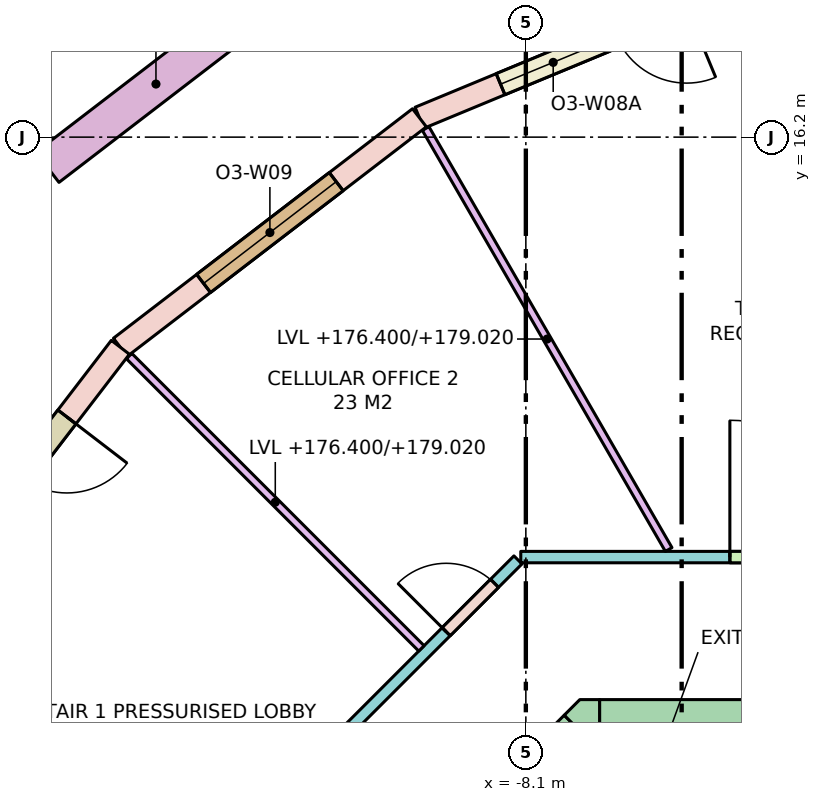
"""IFC4 building model, lengths in metres.
Left out: names, types, materials, properties, quantities, classifications, styles, units other than length and angle.
Written with IfcOpenShell. Run it as: python <this file> out.ifc"""

import sys

from ifc_helpers import new_model, si_unit, direction, frame, frame_2d, origin, place, context, subcontext, project, spatial, polyline, rectangle, outline, extrude, element, fill, save


model = new_model("IFC4")
c1 = context("Model", 3, precision=1e-05, world=origin(), true_north=direction((0.0, 1.0)))
c2 = subcontext(c1, "Body", "Model", "MODEL_VIEW")
j1 = project(units=[si_unit("LENGTHUNIT", "METRE"), si_unit("PLANEANGLEUNIT", "RADIAN")], contexts=[c1])
p1 = place(None, origin())
s1 = spatial("IfcSite", under=j1, at=p1, CompositionType="ELEMENT")
p2 = place(p1, origin())
s2 = spatial("IfcBuilding", under=s1, at=p2, CompositionType="ELEMENT")
p3 = place(p2, frame((0.0, 0.0, 176.4)))
s3 = spatial("IfcBuildingStorey", under=s2, at=p3, CompositionType="ELEMENT", Elevation=176.4)
p4 = place(p3, frame((-7.13, 8.45, -0.28), z_axis=(0.0, 0.0, 1.0), x_axis=(1.0, 0.0, 0.0)))
e1 = element("IfcWall", 1, at=p4, inside=s3, PredefinedType="SHEAR", context=c2, shape_type="SweptSolid", body=[
    extrude(rectangle(XDim=14.26, YDim=0.7, at=frame_2d((7.13, 0.0))), origin(), (0.0, 0.0, 1.0), 3.7),
])
p5 = place(p4, frame((5.48, 0.0, 0.28)))
e2 = element("IfcOpeningElement", 2, at=p5, cuts=e1, PredefinedType="OPENING", context=c2, shape_type="SweptSolid", body=[
    extrude(rectangle(XDim=0.7, YDim=2.1, at=frame_2d((0.35, 1.05))), frame((0.0, 0.36, 0.0), z_axis=(0.0, -1.0, 0.0), x_axis=(1.0, 0.0, 0.0)), (0.0, 0.0, 1.0), 0.72),
])
p6 = place(p4, frame((7.155, 0.0, 0.28)))
e3 = element("IfcOpeningElement", 3, at=p6, cuts=e1, PredefinedType="OPENING", context=c2, shape_type="SweptSolid", body=[
    extrude(rectangle(XDim=0.9, YDim=2.1, at=frame_2d((0.45, 1.05))), frame((0.0, 0.36, 0.0), z_axis=(0.0, -1.0, 0.0), x_axis=(1.0, 0.0, 0.0)), (0.0, 0.0, 1.0), 0.72),
])
p7 = place(p3, frame((-10.347, 5.347, -0.28), z_axis=(0.0, 0.0, 1.0), x_axis=(0.707106781187, 0.707106781187, 0.0)))
e4 = element("IfcWall", 4, at=p7, inside=s3, PredefinedType="SHEAR", context=c2, shape_type="SweptSolid", body=[
    extrude(rectangle(XDim=4.243, YDim=0.7, at=frame_2d((2.121, 0.0))), origin(), (0.0, 0.0, 1.0), 3.7),
])
p8 = place(p7, frame((0.65, 0.0, 0.28)))
e5 = element("IfcOpeningElement", 5, at=p8, cuts=e4, PredefinedType="OPENING", context=c2, shape_type="SweptSolid", body=[
    extrude(rectangle(XDim=1.2, YDim=2.1, at=frame_2d((0.6, 1.05))), frame((0.0, 0.36, 0.0), z_axis=(0.0, -1.0, 0.0), x_axis=(1.0, 0.0, 0.0)), (0.0, 0.0, 1.0), 0.72),
])
p9 = place(p3, frame((0.0, 0.0, -0.28)))
e6 = element("IfcWall", 6, at=p9, inside=s3, PredefinedType="SHEAR", context=c2, shape_type="SweptSolid", body=[
    extrude(outline(polyline([(-7.39, 8.8), (-7.13, 8.8), (-7.13, 8.8), (-7.13, 8.13), (-7.595, 8.595), (-7.595, 8.595), (-7.595, 8.595), (-7.39, 8.8)])), origin(), (0.0, 0.0, 1.0), 3.7),
])
p10 = place(p3, frame((-4.917, 18.353, 0.0), z_axis=(0.0, 0.0, 1.0), x_axis=(-0.923893254961, -0.382650301762, 0.0)))
e7 = element("IfcWall", 7, at=p10, inside=s3, PredefinedType="STANDARD", context=c2, shape_type="SweptSolid", body=[
    extrude(rectangle(XDim=4.96, YDim=0.3, at=frame_2d((2.48, 0.0))), origin(), (0.0, 0.0, 1.0), 3.42),
])
p11 = place(p10, frame((1.155, 0.0, 0.0)))
e8 = element("IfcOpeningElement", 8, at=p11, cuts=e7, PredefinedType="OPENING", context=c2, shape_type="SweptSolid", body=[
    extrude(rectangle(XDim=1.0, YDim=2.4, at=frame_2d((0.5, 1.2))), frame((0.0, 0.16, 0.0), z_axis=(0.0, -1.0, 0.0), x_axis=(1.0, 0.0, 0.0)), (0.0, 0.0, 1.0), 0.32),
])
p12 = place(p10, frame((2.305, 0.0, 0.8)))
e9 = element("IfcOpeningElement", 9, at=p12, cuts=e7, PredefinedType="OPENING", context=c2, shape_type="SweptSolid", body=[
    extrude(rectangle(XDim=1.5, YDim=2.4, at=frame_2d((0.75, 1.2))), frame((0.0, 0.16, 0.0), z_axis=(0.0, -1.0, 0.0), x_axis=(1.0, 0.0, 0.0)), (0.0, 0.0, 1.0), 0.32),
])
p13 = place(p3, frame((-9.5, 16.455, 0.0), z_axis=(0.0, 0.0, 1.0), x_axis=(-0.793348024649, -0.608768356425, 0.0)))
e10 = element("IfcWall", 10, at=p13, inside=s3, PredefinedType="STANDARD", context=c2, shape_type="SweptSolid", body=[
    extrude(rectangle(XDim=4.96, YDim=0.3, at=frame_2d((2.48, 0.0))), origin(), (0.0, 0.0, 1.0), 3.42),
])
p14 = place(p13, frame((1.38, 0.0, 0.8)))
e11 = element("IfcOpeningElement", 11, at=p14, cuts=e10, PredefinedType="OPENING", context=c2, shape_type="SweptSolid", body=[
    extrude(rectangle(XDim=2.2, YDim=2.4, at=frame_2d((1.1, 1.2))), frame((0.0, 0.16, 0.0), z_axis=(0.0, -1.0, 0.0), x_axis=(1.0, 0.0, 0.0)), (0.0, 0.0, 1.0), 0.32),
])
p15 = place(p3, frame((-13.435, 13.435, 0.0), z_axis=(0.0, 0.0, 1.0), x_axis=(-0.608768356425, -0.793348024649, 0.0)))
e12 = element("IfcWall", 12, at=p15, inside=s3, PredefinedType="STANDARD", context=c2, shape_type="SweptSolid", body=[
    extrude(rectangle(XDim=4.96, YDim=0.3, at=frame_2d((2.48, 0.0))), origin(), (0.0, 0.0, 1.0), 3.42),
])
p16 = place(p15, frame((1.155, 0.0, 0.0)))
e13 = element("IfcOpeningElement", 13, at=p16, cuts=e12, PredefinedType="OPENING", context=c2, shape_type="SweptSolid", body=[
    extrude(rectangle(XDim=1.0, YDim=2.4, at=frame_2d((0.5, 1.2))), frame((0.0, 0.16, 0.0), z_axis=(0.0, -1.0, 0.0), x_axis=(1.0, 0.0, 0.0)), (0.0, 0.0, 1.0), 0.32),
])
p17 = place(p15, frame((2.305, 0.0, 0.8)))
e14 = element("IfcOpeningElement", 14, at=p17, cuts=e12, PredefinedType="OPENING", context=c2, shape_type="SweptSolid", body=[
    extrude(rectangle(XDim=1.5, YDim=2.4, at=frame_2d((0.75, 1.2))), frame((0.0, 0.16, 0.0), z_axis=(0.0, -1.0, 0.0), x_axis=(1.0, 0.0, 0.0)), (0.0, 0.0, 1.0), 0.32),
])
p18 = place(p3, frame((-11.539, 17.994, 0.0), z_axis=(0.0, 0.0, 1.0), x_axis=(-0.793384730612, -0.608720518162, 0.0)))
e15 = element("IfcWall", 15, at=p18, inside=s3, PredefinedType="PARAPET", context=c2, shape_type="SweptSolid", body=[
    extrude(rectangle(XDim=3.6, YDim=0.5, at=frame_2d((1.8, 0.0))), origin(), (0.0, 0.0, 1.0), 0.9),
])
p19 = place(p3, frame((-12.638, 6.204, 0.0), z_axis=(0.0, 0.0, 1.0), x_axis=(0.707106781187, 0.707106781187, 0.0)))
e16 = element("IfcWall", 16, at=p19, inside=s3, PredefinedType="PARTITIONING", context=c2, shape_type="SweptSolid", body=[
    extrude(rectangle(XDim=6.271, YDim=0.15, at=frame_2d((3.135, 0.0))), origin(), (0.0, 0.0, 1.0), 2.62),
])
p20 = place(p19, frame((4.935, 0.0, 0.0)))
e17 = element("IfcOpeningElement", 17, at=p20, cuts=e16, PredefinedType="OPENING", context=c2, shape_type="SweptSolid", body=[
    extrude(rectangle(XDim=0.9, YDim=2.1, at=frame_2d((0.45, 1.05))), frame((0.0, 0.085, 0.0), z_axis=(0.0, -1.0, 0.0), x_axis=(1.0, 0.0, 0.0)), (0.0, 0.0, 1.0), 0.17),
])
p21 = place(p3, frame((-8.167, 10.675, 0.0), z_axis=(0.0, 0.0, 1.0), x_axis=(1.0, 0.0, 0.0)))
e18 = element("IfcWall", 18, at=p21, inside=s3, PredefinedType="PARTITIONING", context=c2, shape_type="SweptSolid", body=[
    extrude(rectangle(XDim=16.333, YDim=0.15, at=frame_2d((8.167, 0.0))), origin(), (0.0, 0.0, 1.0), 2.62),
])
p22 = place(p21, frame((12.232, 0.0, 0.0)))
e19 = element("IfcOpeningElement", 19, at=p22, cuts=e18, PredefinedType="OPENING", context=c2, shape_type="SweptSolid", body=[
    extrude(rectangle(XDim=0.9, YDim=2.1, at=frame_2d((0.45, 1.05))), frame((0.0, 0.085, 0.0), z_axis=(0.0, -1.0, 0.0), x_axis=(1.0, 0.0, 0.0)), (0.0, 0.0, 1.0), 0.17),
])
p23 = place(p21, frame((9.148, 0.0, 0.0)))
e20 = element("IfcOpeningElement", 20, at=p23, cuts=e18, PredefinedType="OPENING", context=c2, shape_type="SweptSolid", body=[
    extrude(rectangle(XDim=0.9, YDim=2.1, at=frame_2d((0.45, 1.05))), frame((0.0, 0.085, 0.0), z_axis=(0.0, -1.0, 0.0), x_axis=(1.0, 0.0, 0.0)), (0.0, 0.0, 1.0), 0.17),
])
p24 = place(p21, frame((6.285, 0.0, 0.0)))
e21 = element("IfcOpeningElement", 21, at=p24, cuts=e18, PredefinedType="OPENING", context=c2, shape_type="SweptSolid", body=[
    extrude(rectangle(XDim=0.9, YDim=2.1, at=frame_2d((0.45, 1.05))), frame((0.0, 0.085, 0.0), z_axis=(0.0, -1.0, 0.0), x_axis=(1.0, 0.0, 0.0)), (0.0, 0.0, 1.0), 0.17),
])
p25 = place(p21, frame((2.751, 0.0, 0.0)))
e22 = element("IfcOpeningElement", 22, at=p25, cuts=e18, PredefinedType="OPENING", context=c2, shape_type="SweptSolid", body=[
    extrude(rectangle(XDim=1.8, YDim=2.1, at=frame_2d((0.9, 1.05))), frame((0.0, 0.085, 0.0), z_axis=(0.0, -1.0, 0.0), x_axis=(1.0, 0.0, 0.0)), (0.0, 0.0, 1.0), 0.17),
])
p26 = place(p3, frame((-6.221, 10.775, 0.0), z_axis=(0.0, 0.0, 1.0), x_axis=(-0.500023166934, 0.866012027936, 0.0)))
e23 = element("IfcWall", 23, at=p26, inside=s3, PredefinedType="PARTITIONING", context=c2, shape_type="SweptSolid", body=[
    extrude(rectangle(XDim=6.395, YDim=0.1, at=frame_2d((3.198, 0.0))), origin(), (0.0, 0.0, 1.0), 2.62),
])
p27 = place(p3, frame((-9.474, 9.474, 0.0), z_axis=(0.0, 0.0, 1.0), x_axis=(-0.707106781187, 0.707106781187, 0.0)))
e24 = element("IfcWall", 24, at=p27, inside=s3, PredefinedType="PARTITIONING", context=c2, shape_type="SweptSolid", body=[
    extrude(rectangle(XDim=5.439, YDim=0.1, at=frame_2d((2.719, 0.0))), origin(), (0.0, 0.0, 1.0), 2.62),
])
p28 = place(p12, origin())
e25 = element("IfcWindow", 25, at=p28, inside=s3, PartitioningType="SINGLE_PANEL", PredefinedType="WINDOW", context=c2, shape_type="SweptSolid", body=[
    extrude(rectangle(XDim=1.5, YDim=2.4, at=frame_2d((0.75, 1.2))), frame((0.0, 0.03, 0.0), z_axis=(0.0, -1.0, 0.0), x_axis=(1.0, 0.0, 0.0)), (0.0, 0.0, 1.0), 0.06),
])
fill(e9, e25)
p29 = place(p14, origin())
e26 = element("IfcWindow", 26, at=p29, inside=s3, PartitioningType="SINGLE_PANEL", PredefinedType="WINDOW", context=c2, shape_type="SweptSolid", body=[
    extrude(rectangle(XDim=2.2, YDim=2.4, at=frame_2d((1.1, 1.2))), frame((0.0, 0.03, 0.0), z_axis=(0.0, -1.0, 0.0), x_axis=(1.0, 0.0, 0.0)), (0.0, 0.0, 1.0), 0.06),
])
fill(e11, e26)
p30 = place(p16, origin())
e27 = element("IfcDoor", 27, at=p30, inside=s3, OperationType="SINGLE_SWING_LEFT", PredefinedType="DOOR", context=c2, shape_type="SweptSolid", body=[
    extrude(rectangle(XDim=1.0, YDim=2.4, at=frame_2d((0.5, 1.2))), frame((0.0, 0.025, 0.0), z_axis=(0.0, -1.0, 0.0), x_axis=(1.0, 0.0, 0.0)), (0.0, 0.0, 1.0), 0.05),
])
fill(e13, e27)
p31 = place(p25, origin())
e28 = element("IfcDoor", 28, at=p31, inside=s3, OperationType="DOUBLE_DOOR_SINGLE_SWING", PredefinedType="DOOR", context=c2, shape_type="SweptSolid", body=[
    extrude(rectangle(XDim=1.8, YDim=2.1, at=frame_2d((0.9, 1.05))), frame((0.0, 0.025, 0.0), z_axis=(0.0, -1.0, 0.0), x_axis=(1.0, 0.0, 0.0)), (0.0, 0.0, 1.0), 0.05),
])
fill(e22, e28)
p32 = place(p20, origin())
e29 = element("IfcDoor", 29, at=p32, inside=s3, OperationType="SINGLE_SWING_LEFT", PredefinedType="DOOR", context=c2, shape_type="SweptSolid", body=[
    extrude(rectangle(XDim=0.9, YDim=2.1, at=frame_2d((0.45, 1.05))), frame((0.0, 0.025, 0.0), z_axis=(0.0, -1.0, 0.0), x_axis=(1.0, 0.0, 0.0)), (0.0, 0.0, 1.0), 0.05),
])
fill(e17, e29)
save(model, sys.argv[1])
